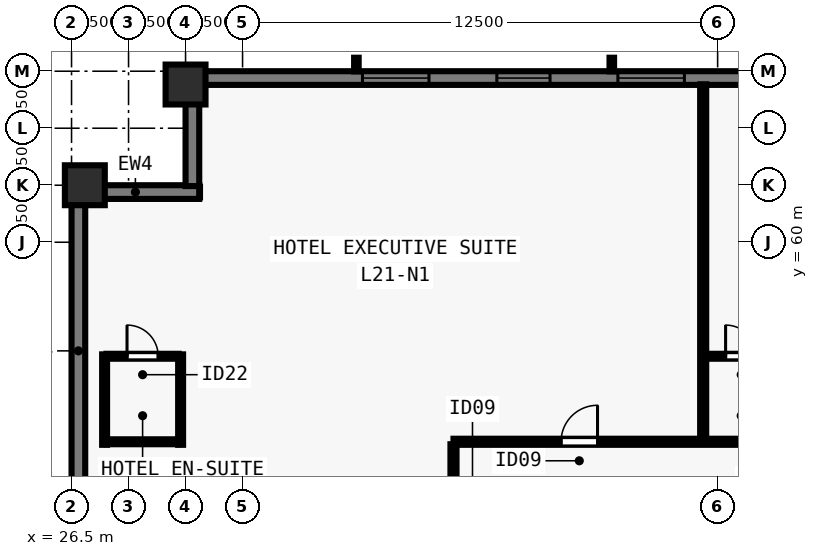
"""IFC4 building model, lengths in metres.
Left out: names, types, materials, properties, quantities, classifications, styles, units other than length and angle.
Written with IfcOpenShell. Run it as: python <this file> out.ifc"""

import sys

from ifc_helpers import new_model, si_unit, direction, frame, frame_2d, origin, origin_2d, place, context, subcontext, project, spatial, rectangle, extrude, element, fill, save


model = new_model("IFC4")
c1 = context("Model", 3, precision=1e-05, world=origin(), true_north=direction((0.0, 1.0)))
c2 = subcontext(c1, "Body", "Model", "MODEL_VIEW")
j1 = project(units=[si_unit("LENGTHUNIT", "METRE"), si_unit("PLANEANGLEUNIT", "RADIAN")], contexts=[c1])
p1 = place(None, origin())
s1 = spatial("IfcSite", under=j1, at=p1, CompositionType="ELEMENT")
p2 = place(p1, origin())
s2 = spatial("IfcBuilding", under=s1, at=p2, CompositionType="ELEMENT")
p3 = place(p2, frame((0.0, 0.0, 79.5)))
s3 = spatial("IfcBuildingStorey", under=s2, at=p3, CompositionType="ELEMENT", Elevation=79.5)
for number, where, z_axis, x_axis in (
    (1, (29.5, 64.15, 0.0), (0.0, 0.0, 1.0), (1.0, 0.0, 0.0)),
    (2, (26.85, 61.5, 0.0), (0.0, 0.0, 1.0), (0.0, 1.0, 0.0)),
):
    element("IfcColumn", number, at=place(p3, frame(where, z_axis=z_axis, x_axis=x_axis)), inside=s3, PredefinedType="COLUMN", context=c2, shape_type="SweptSolid", body=[
        extrude(rectangle(XDim=1.05, YDim=1.05, at=origin_2d()), origin(), (0.0, 0.0, 1.0), 3.5),
    ])
p4 = place(p3, frame((26.68, 16.5, 0.0), z_axis=(0.0, 0.0, 1.0), x_axis=(0.0, 1.0, 0.0)))
e3 = element("IfcWall", 3, at=p4, inside=s3, PredefinedType="SOLIDWALL", context=c2, shape_type="SweptSolid", body=[
    extrude(rectangle(XDim=44.662, YDim=0.36, at=frame_2d((22.331, 0.0))), origin(), (0.0, 0.0, 1.0), 3.28),
])
p5 = place(p4, frame((8.19, 0.0, 0.8)))
e4 = element("IfcOpeningElement", 4, at=p5, cuts=e3, PredefinedType="OPENING", context=c2, shape_type="SweptSolid", body=[
    extrude(rectangle(XDim=1.4, YDim=1.544, at=frame_2d((0.7, 0.772))), frame((0.0, 0.19, 0.0), z_axis=(0.0, -1.0, 0.0), x_axis=(1.0, 0.0, 0.0)), (0.0, 0.0, 1.0), 0.38),
])
p6 = place(p4, frame((11.375, 0.0, 0.8)))
e5 = element("IfcOpeningElement", 5, at=p6, cuts=e3, PredefinedType="OPENING", context=c2, shape_type="SweptSolid", body=[
    extrude(rectangle(XDim=1.75, YDim=1.544, at=frame_2d((0.875, 0.772))), frame((0.0, 0.19, 0.0), z_axis=(0.0, -1.0, 0.0), x_axis=(1.0, 0.0, 0.0)), (0.0, 0.0, 1.0), 0.38),
])
p7 = place(p4, frame((15.361, 0.0, 0.8)))
e6 = element("IfcOpeningElement", 6, at=p7, cuts=e3, PredefinedType="OPENING", context=c2, shape_type="SweptSolid", body=[
    extrude(rectangle(XDim=1.4, YDim=1.544, at=frame_2d((0.7, 0.772))), frame((0.0, 0.19, 0.0), z_axis=(0.0, -1.0, 0.0), x_axis=(1.0, 0.0, 0.0)), (0.0, 0.0, 1.0), 0.38),
])
p8 = place(p4, frame((18.546, 0.0, 0.8)))
e7 = element("IfcOpeningElement", 7, at=p8, cuts=e3, PredefinedType="OPENING", context=c2, shape_type="SweptSolid", body=[
    extrude(rectangle(XDim=1.75, YDim=1.544, at=frame_2d((0.875, 0.772))), frame((0.0, 0.19, 0.0), z_axis=(0.0, -1.0, 0.0), x_axis=(1.0, 0.0, 0.0)), (0.0, 0.0, 1.0), 0.38),
])
p9 = place(p4, frame((22.881, 0.0, 0.8)))
e8 = element("IfcOpeningElement", 8, at=p9, cuts=e3, PredefinedType="OPENING", context=c2, shape_type="SweptSolid", body=[
    extrude(rectangle(XDim=1.4, YDim=1.544, at=frame_2d((0.7, 0.772))), frame((0.0, 0.19, 0.0), z_axis=(0.0, -1.0, 0.0), x_axis=(1.0, 0.0, 0.0)), (0.0, 0.0, 1.0), 0.38),
])
p10 = place(p4, frame((28.351, 0.0, 0.8)))
e9 = element("IfcOpeningElement", 9, at=p10, cuts=e3, PredefinedType="OPENING", context=c2, shape_type="SweptSolid", body=[
    extrude(rectangle(XDim=1.4, YDim=1.544, at=frame_2d((0.7, 0.772))), frame((0.0, 0.19, 0.0), z_axis=(0.0, -1.0, 0.0), x_axis=(1.0, 0.0, 0.0)), (0.0, 0.0, 1.0), 0.38),
])
p11 = place(p4, frame((31.537, 0.0, 0.8)))
e10 = element("IfcOpeningElement", 10, at=p11, cuts=e3, PredefinedType="OPENING", context=c2, shape_type="SweptSolid", body=[
    extrude(rectangle(XDim=1.75, YDim=1.544, at=frame_2d((0.875, 0.772))), frame((0.0, 0.19, 0.0), z_axis=(0.0, -1.0, 0.0), x_axis=(1.0, 0.0, 0.0)), (0.0, 0.0, 1.0), 0.38),
])
p12 = place(p4, frame((35.072, 0.0, 0.8)))
e11 = element("IfcOpeningElement", 11, at=p12, cuts=e3, PredefinedType="OPENING", context=c2, shape_type="SweptSolid", body=[
    extrude(rectangle(XDim=1.4, YDim=1.544, at=frame_2d((0.7, 0.772))), frame((0.0, 0.19, 0.0), z_axis=(0.0, -1.0, 0.0), x_axis=(1.0, 0.0, 0.0)), (0.0, 0.0, 1.0), 0.38),
])
p13 = place(p3, frame((26.5, 61.32, 0.0), z_axis=(0.0, 0.0, 1.0), x_axis=(1.0, 0.0, 0.0)))
e12 = element("IfcWall", 12, at=p13, inside=s3, PredefinedType="SOLIDWALL", context=c2, shape_type="SweptSolid", body=[
    extrude(rectangle(XDim=3.36, YDim=0.36, at=frame_2d((1.68, 0.0))), origin(), (0.0, 0.0, 1.0), 3.28),
])
p14 = place(p3, frame((29.68, 61.478, 0.0), z_axis=(0.0, 0.0, 1.0), x_axis=(0.0, 1.0, 0.0)))
e13 = element("IfcWall", 13, at=p14, inside=s3, PredefinedType="SOLIDWALL", context=c2, shape_type="SweptSolid", body=[
    extrude(rectangle(XDim=2.684, YDim=0.36, at=frame_2d((1.342, 0.0))), origin(), (0.0, 0.0, 1.0), 3.28),
])
p15 = place(p3, frame((29.5, 64.32, 0.0), z_axis=(0.0, 0.0, 1.0), x_axis=(1.0, 0.0, 0.0)))
e14 = element("IfcWall", 14, at=p15, inside=s3, PredefinedType="SOLIDWALL", context=c2, shape_type="SweptSolid", body=[
    extrude(rectangle(XDim=44.662, YDim=0.36, at=frame_2d((22.331, 0.0))), origin(), (0.0, 0.0, 1.0), 3.28),
])
p16 = place(p15, frame((4.655, 0.0, 0.8)))
e15 = element("IfcOpeningElement", 15, at=p16, cuts=e14, PredefinedType="OPENING", context=c2, shape_type="SweptSolid", body=[
    extrude(rectangle(XDim=1.75, YDim=1.544, at=frame_2d((0.875, 0.772))), frame((0.0, 0.19, 0.0), z_axis=(0.0, -1.0, 0.0), x_axis=(1.0, 0.0, 0.0)), (0.0, 0.0, 1.0), 0.38),
])
p17 = place(p15, frame((8.19, 0.0, 0.8)))
e16 = element("IfcOpeningElement", 16, at=p17, cuts=e14, PredefinedType="OPENING", context=c2, shape_type="SweptSolid", body=[
    extrude(rectangle(XDim=1.4, YDim=1.544, at=frame_2d((0.7, 0.772))), frame((0.0, 0.19, 0.0), z_axis=(0.0, -1.0, 0.0), x_axis=(1.0, 0.0, 0.0)), (0.0, 0.0, 1.0), 0.38),
])
p18 = place(p15, frame((11.375, 0.0, 0.8)))
e17 = element("IfcOpeningElement", 17, at=p18, cuts=e14, PredefinedType="OPENING", context=c2, shape_type="SweptSolid", body=[
    extrude(rectangle(XDim=1.75, YDim=1.544, at=frame_2d((0.875, 0.772))), frame((0.0, 0.19, 0.0), z_axis=(0.0, -1.0, 0.0), x_axis=(1.0, 0.0, 0.0)), (0.0, 0.0, 1.0), 0.38),
])
p19 = place(p15, frame((14.911, 0.0, 0.8)))
e18 = element("IfcOpeningElement", 18, at=p19, cuts=e14, PredefinedType="OPENING", context=c2, shape_type="SweptSolid", body=[
    extrude(rectangle(XDim=1.4, YDim=1.544, at=frame_2d((0.7, 0.772))), frame((0.0, 0.19, 0.0), z_axis=(0.0, -1.0, 0.0), x_axis=(1.0, 0.0, 0.0)), (0.0, 0.0, 1.0), 0.38),
])
p20 = place(p15, frame((18.546, 0.0, 0.8)))
e19 = element("IfcOpeningElement", 19, at=p20, cuts=e14, PredefinedType="OPENING", context=c2, shape_type="SweptSolid", body=[
    extrude(rectangle(XDim=1.75, YDim=1.544, at=frame_2d((0.875, 0.772))), frame((0.0, 0.19, 0.0), z_axis=(0.0, -1.0, 0.0), x_axis=(1.0, 0.0, 0.0)), (0.0, 0.0, 1.0), 0.38),
])
p21 = place(p15, frame((21.631, 0.0, 0.8)))
e20 = element("IfcOpeningElement", 20, at=p21, cuts=e14, PredefinedType="OPENING", context=c2, shape_type="SweptSolid", body=[
    extrude(rectangle(XDim=1.4, YDim=1.544, at=frame_2d((0.7, 0.772))), frame((0.0, 0.19, 0.0), z_axis=(0.0, -1.0, 0.0), x_axis=(1.0, 0.0, 0.0)), (0.0, 0.0, 1.0), 0.38),
])
p22 = place(p15, frame((24.366, 0.0, 0.8)))
e21 = element("IfcOpeningElement", 21, at=p22, cuts=e14, PredefinedType="OPENING", context=c2, shape_type="SweptSolid", body=[
    extrude(rectangle(XDim=1.75, YDim=1.544, at=frame_2d((0.875, 0.772))), frame((0.0, 0.19, 0.0), z_axis=(0.0, -1.0, 0.0), x_axis=(1.0, 0.0, 0.0)), (0.0, 0.0, 1.0), 0.38),
])
p23 = place(p15, frame((28.351, 0.0, 0.8)))
e22 = element("IfcOpeningElement", 22, at=p23, cuts=e14, PredefinedType="OPENING", context=c2, shape_type="SweptSolid", body=[
    extrude(rectangle(XDim=1.4, YDim=1.544, at=frame_2d((0.7, 0.772))), frame((0.0, 0.19, 0.0), z_axis=(0.0, -1.0, 0.0), x_axis=(1.0, 0.0, 0.0)), (0.0, 0.0, 1.0), 0.38),
])
p24 = place(p15, frame((31.537, 0.0, 0.8)))
e23 = element("IfcOpeningElement", 23, at=p24, cuts=e14, PredefinedType="OPENING", context=c2, shape_type="SweptSolid", body=[
    extrude(rectangle(XDim=1.75, YDim=1.544, at=frame_2d((0.875, 0.772))), frame((0.0, 0.19, 0.0), z_axis=(0.0, -1.0, 0.0), x_axis=(1.0, 0.0, 0.0)), (0.0, 0.0, 1.0), 0.38),
])
p25 = place(p15, frame((35.072, 0.0, 0.8)))
e24 = element("IfcOpeningElement", 24, at=p25, cuts=e14, PredefinedType="OPENING", context=c2, shape_type="SweptSolid", body=[
    extrude(rectangle(XDim=1.4, YDim=1.544, at=frame_2d((0.7, 0.772))), frame((0.0, 0.19, 0.0), z_axis=(0.0, -1.0, 0.0), x_axis=(1.0, 0.0, 0.0)), (0.0, 0.0, 1.0), 0.38),
])
p26 = place(p15, frame((38.257, 0.0, 0.8)))
e25 = element("IfcOpeningElement", 25, at=p26, cuts=e14, PredefinedType="OPENING", context=c2, shape_type="SweptSolid", body=[
    extrude(rectangle(XDim=1.75, YDim=1.544, at=frame_2d((0.875, 0.772))), frame((0.0, 0.19, 0.0), z_axis=(0.0, -1.0, 0.0), x_axis=(1.0, 0.0, 0.0)), (0.0, 0.0, 1.0), 0.38),
])
p27 = place(p3, frame((36.55, 54.75, 0.0), z_axis=(0.0, 0.0, 1.0), x_axis=(1.0, 0.0, 0.0)))
e26 = element("IfcWall", 26, at=p27, inside=s3, PredefinedType="PARTITIONING", context=c2, shape_type="SweptSolid", body=[
    extrude(rectangle(XDim=30.9, YDim=0.16, at=frame_2d((15.45, 0.0))), origin(), (0.0, 0.0, 1.0), 3.28),
])
p28 = place(p27, frame((2.83, 0.0, 0.0)))
e27 = element("IfcOpeningElement", 27, at=p28, cuts=e26, PredefinedType="OPENING", context=c2, shape_type="SweptSolid", body=[
    extrude(rectangle(XDim=0.96, YDim=2.15, at=frame_2d((0.48, 1.075))), frame((0.0, 0.09, 0.0), z_axis=(0.0, -1.0, 0.0), x_axis=(1.0, 0.0, 0.0)), (0.0, 0.0, 1.0), 0.18),
])
p29 = place(p27, frame((15.965, 0.0, 0.0)))
e28 = element("IfcOpeningElement", 28, at=p29, cuts=e26, PredefinedType="OPENING", context=c2, shape_type="SweptSolid", body=[
    extrude(rectangle(XDim=0.96, YDim=2.15, at=frame_2d((0.48, 1.075))), frame((0.0, 0.09, 0.0), z_axis=(0.0, -1.0, 0.0), x_axis=(1.0, 0.0, 0.0)), (0.0, 0.0, 1.0), 0.18),
])
p30 = place(p27, frame((28.105, 0.0, 0.0)))
e29 = element("IfcOpeningElement", 29, at=p30, cuts=e26, PredefinedType="OPENING", context=c2, shape_type="SweptSolid", body=[
    extrude(rectangle(XDim=0.96, YDim=2.15, at=frame_2d((0.48, 1.075))), frame((0.0, 0.09, 0.0), z_axis=(0.0, -1.0, 0.0), x_axis=(1.0, 0.0, 0.0)), (0.0, 0.0, 1.0), 0.18),
])
p31 = place(p3, frame((36.55, 23.315, 0.0), z_axis=(0.0, 0.0, 1.0), x_axis=(0.0, 1.0, 0.0)))
e30 = element("IfcWall", 30, at=p31, inside=s3, PredefinedType="PARTITIONING", context=c2, shape_type="SweptSolid", body=[
    extrude(rectangle(XDim=31.37, YDim=0.16, at=frame_2d((15.685, 0.0))), origin(), (0.0, 0.0, 1.0), 3.28),
])
p32 = place(p31, frame((4.848, 0.0, 0.0)))
e31 = element("IfcOpeningElement", 31, at=p32, cuts=e30, PredefinedType="OPENING", context=c2, shape_type="SweptSolid", body=[
    extrude(rectangle(XDim=0.96, YDim=2.15, at=frame_2d((0.48, 1.075))), frame((0.0, 0.09, 0.0), z_axis=(0.0, -1.0, 0.0), x_axis=(1.0, 0.0, 0.0)), (0.0, 0.0, 1.0), 0.18),
])
p33 = place(p31, frame((12.39, 0.0, 0.0)))
e32 = element("IfcOpeningElement", 32, at=p33, cuts=e30, PredefinedType="OPENING", context=c2, shape_type="SweptSolid", body=[
    extrude(rectangle(XDim=0.96, YDim=2.15, at=frame_2d((0.48, 1.075))), frame((0.0, 0.09, 0.0), z_axis=(0.0, -1.0, 0.0), x_axis=(1.0, 0.0, 0.0)), (0.0, 0.0, 1.0), 0.18),
])
p34 = place(p31, frame((20.265, 0.0, 0.0)))
e33 = element("IfcOpeningElement", 33, at=p34, cuts=e30, PredefinedType="OPENING", context=c2, shape_type="SweptSolid", body=[
    extrude(rectangle(XDim=0.96, YDim=2.15, at=frame_2d((0.48, 1.075))), frame((0.0, 0.09, 0.0), z_axis=(0.0, -1.0, 0.0), x_axis=(1.0, 0.0, 0.0)), (0.0, 0.0, 1.0), 0.18),
])
p35 = place(p31, frame((28.223, 0.0, 0.0)))
e34 = element("IfcOpeningElement", 34, at=p35, cuts=e30, PredefinedType="OPENING", context=c2, shape_type="SweptSolid", body=[
    extrude(rectangle(XDim=0.96, YDim=2.15, at=frame_2d((0.48, 1.075))), frame((0.0, 0.09, 0.0), z_axis=(0.0, -1.0, 0.0), x_axis=(1.0, 0.0, 0.0)), (0.0, 0.0, 1.0), 0.18),
])
for number, where, z_axis, x_axis in (
    (35, (27.37, 54.67, 0.0), (0.0, 0.0, 1.0), (0.0, 1.0, 0.0)),
    (36, (29.37, 54.67, 0.0), (0.0, 0.0, 1.0), (0.0, 1.0, 0.0)),
):
    element("IfcWall", number, at=place(p3, frame(where, z_axis=z_axis, x_axis=x_axis)), inside=s3, PredefinedType="PLUMBINGWALL", context=c2, shape_type="SweptSolid", body=[
        extrude(rectangle(XDim=2.38, YDim=0.13, at=frame_2d((1.19, 0.0))), origin(), (0.0, 0.0, 1.0), 3.28),
    ])
p36 = place(p3, frame((27.42, 57.0, 0.0), z_axis=(0.0, 0.0, 1.0), x_axis=(1.0, 0.0, 0.0)))
e37 = element("IfcWall", 37, at=p36, inside=s3, PredefinedType="PLUMBINGWALL", context=c2, shape_type="SweptSolid", body=[
    extrude(rectangle(XDim=1.9, YDim=0.13, at=frame_2d((0.95, 0.0))), origin(), (0.0, 0.0, 1.0), 3.28),
])
p37 = place(p36, frame((0.54, 0.0, 0.0)))
e38 = element("IfcOpeningElement", 38, at=p37, cuts=e37, PredefinedType="OPENING", context=c2, shape_type="SweptSolid", body=[
    extrude(rectangle(XDim=0.82, YDim=2.1, at=frame_2d((0.41, 1.05))), frame((0.0, 0.075, 0.0), z_axis=(0.0, -1.0, 0.0), x_axis=(1.0, 0.0, 0.0)), (0.0, 0.0, 1.0), 0.15),
])
p38 = place(p3, frame((27.42, 54.75, 0.0), z_axis=(0.0, 0.0, 1.0), x_axis=(1.0, 0.0, 0.0)))
e39 = element("IfcWall", 39, at=p38, inside=s3, PredefinedType="PLUMBINGWALL", context=c2, shape_type="SweptSolid", body=[
    extrude(rectangle(XDim=1.9, YDim=0.13, at=frame_2d((0.95, 0.0))), origin(), (0.0, 0.0, 1.0), 3.28),
])
p39 = place(p3, frame((43.12, 54.815, 0.0), z_axis=(0.0, 0.0, 1.0), x_axis=(0.0, 1.0, 0.0)))
e40 = element("IfcWall", 40, at=p39, inside=s3, PredefinedType="PARTITIONING", context=c2, shape_type="SweptSolid", body=[
    extrude(rectangle(XDim=9.34, YDim=0.16, at=frame_2d((4.67, 0.0))), origin(), (0.0, 0.0, 1.0), 3.28),
])
p40 = place(p3, frame((43.185, 57.0, 0.0), z_axis=(0.0, 0.0, 1.0), x_axis=(1.0, 0.0, 0.0)))
e41 = element("IfcWall", 41, at=p40, inside=s3, PredefinedType="PLUMBINGWALL", context=c2, shape_type="SweptSolid", body=[
    extrude(rectangle(XDim=1.885, YDim=0.13, at=frame_2d((0.942, 0.0))), origin(), (0.0, 0.0, 1.0), 3.28),
])
p41 = place(p40, frame((0.525, 0.0, 0.0)))
e42 = element("IfcOpeningElement", 42, at=p41, cuts=e41, PredefinedType="OPENING", context=c2, shape_type="SweptSolid", body=[
    extrude(rectangle(XDim=0.82, YDim=2.1, at=frame_2d((0.41, 1.05))), frame((0.0, 0.075, 0.0), z_axis=(0.0, -1.0, 0.0), x_axis=(1.0, 0.0, 0.0)), (0.0, 0.0, 1.0), 0.15),
])
p42 = place(p16, origin())
e43 = element("IfcWindow", 43, at=p42, inside=s3, PartitioningType="SINGLE_PANEL", PredefinedType="WINDOW", context=c2, shape_type="SweptSolid", body=[
    extrude(rectangle(XDim=1.75, YDim=1.544, at=frame_2d((0.875, 0.772))), frame((0.0, -0.05, 0.0), z_axis=(0.0, -1.0, 0.0), x_axis=(1.0, 0.0, 0.0)), (0.0, 0.0, 1.0), 0.06),
])
fill(e15, e43)
p43 = place(p17, origin())
e44 = element("IfcWindow", 44, at=p43, inside=s3, PartitioningType="SINGLE_PANEL", PredefinedType="WINDOW", context=c2, shape_type="SweptSolid", body=[
    extrude(rectangle(XDim=1.4, YDim=1.544, at=frame_2d((0.7, 0.772))), frame((0.0, -0.05, 0.0), z_axis=(0.0, -1.0, 0.0), x_axis=(1.0, 0.0, 0.0)), (0.0, 0.0, 1.0), 0.06),
])
fill(e16, e44)
p44 = place(p18, origin())
e45 = element("IfcWindow", 45, at=p44, inside=s3, PartitioningType="SINGLE_PANEL", PredefinedType="WINDOW", context=c2, shape_type="SweptSolid", body=[
    extrude(rectangle(XDim=1.75, YDim=1.544, at=frame_2d((0.875, 0.772))), frame((0.0, -0.05, 0.0), z_axis=(0.0, -1.0, 0.0), x_axis=(1.0, 0.0, 0.0)), (0.0, 0.0, 1.0), 0.06),
])
fill(e17, e45)
p45 = place(p37, origin())
e46 = element("IfcDoor", 46, at=p45, inside=s3, OperationType="SINGLE_SWING_LEFT", PredefinedType="DOOR", context=c2, shape_type="SweptSolid", body=[
    extrude(rectangle(XDim=0.82, YDim=2.1, at=frame_2d((0.41, 1.05))), frame((0.0, 0.025, 0.0), z_axis=(0.0, -1.0, 0.0), x_axis=(1.0, 0.0, 0.0)), (0.0, 0.0, 1.0), 0.05),
])
fill(e38, e46)
p46 = place(p28, origin())
e47 = element("IfcDoor", 47, at=p46, inside=s3, OperationType="SINGLE_SWING_RIGHT", PredefinedType="DOOR", context=c2, shape_type="SweptSolid", body=[
    extrude(rectangle(XDim=0.96, YDim=2.15, at=frame_2d((0.48, 1.075))), frame((0.0, 0.025, 0.0), z_axis=(0.0, -1.0, 0.0), x_axis=(1.0, 0.0, 0.0)), (0.0, 0.0, 1.0), 0.05),
])
fill(e27, e47)
p47 = place(p41, origin())
e48 = element("IfcDoor", 48, at=p47, inside=s3, OperationType="SINGLE_SWING_LEFT", PredefinedType="DOOR", context=c2, shape_type="SweptSolid", body=[
    extrude(rectangle(XDim=0.82, YDim=2.1, at=frame_2d((0.41, 1.05))), frame((0.0, 0.025, 0.0), z_axis=(0.0, -1.0, 0.0), x_axis=(1.0, 0.0, 0.0)), (0.0, 0.0, 1.0), 0.05),
])
fill(e42, e48)
save(model, sys.argv[1])
